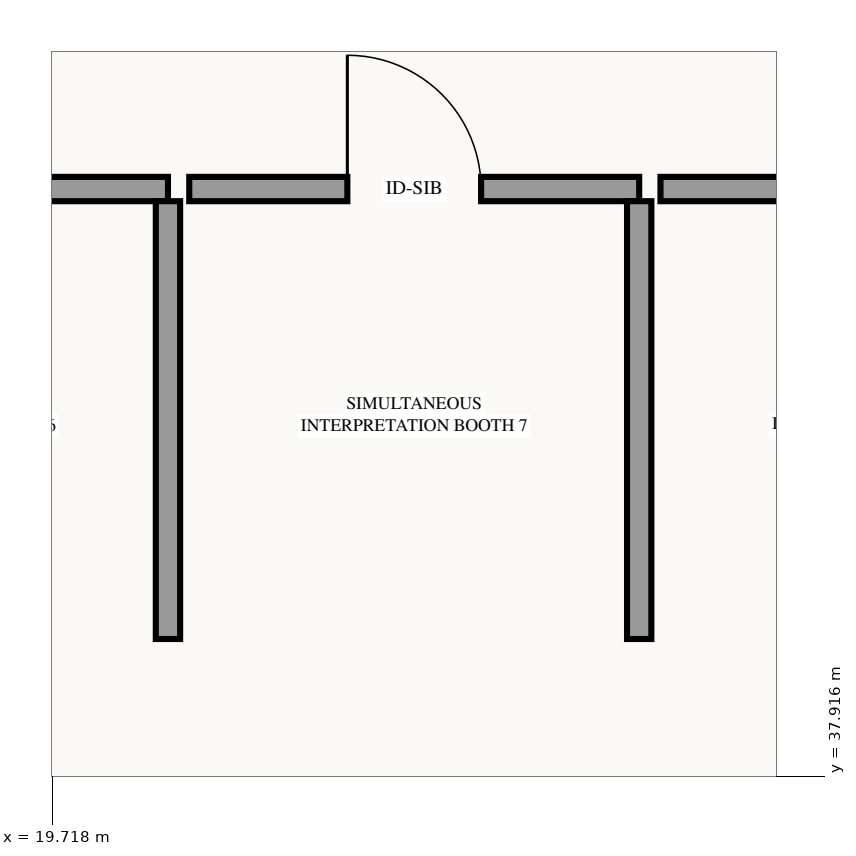
"""IFC4 building model, lengths in metres.
Left out: names, types, materials, properties, quantities, classifications, styles, units other than length and angle.
Written with IfcOpenShell. Run it as: python <this file> out.ifc"""

import sys

from ifc_helpers import new_model, si_unit, direction, frame, frame_2d, origin, place, context, subcontext, project, spatial, rectangle, extrude, element, fill, save


model = new_model("IFC4")
c1 = context("Model", 3, precision=1e-05, world=origin(), true_north=direction((0.0, 1.0)))
c2 = subcontext(c1, "Body", "Model", "MODEL_VIEW")
j1 = project(units=[si_unit("LENGTHUNIT", "METRE"), si_unit("PLANEANGLEUNIT", "RADIAN")], contexts=[c1])
p1 = place(None, origin())
s1 = spatial("IfcSite", under=j1, at=p1, CompositionType="ELEMENT")
p2 = place(p1, origin())
s2 = spatial("IfcBuilding", under=s1, at=p2, CompositionType="ELEMENT")
p3 = place(p2, frame((0.0, 0.0, 5.4)))
s3 = spatial("IfcBuildingStorey", under=s2, at=p3, CompositionType="ELEMENT", Elevation=5.4)
p4 = place(p3, frame((17.52, 41.78, 0.0), z_axis=(0.0, 0.0, 1.0), x_axis=(1.0, 0.0, 0.0)))
e1 = element("IfcWall", 1, at=p4, inside=s3, PredefinedType="PARTITIONING", context=c2, shape_type="SweptSolid", body=[
    extrude(rectangle(XDim=2.96, YDim=0.16, at=frame_2d((1.48, 0.0))), origin(), (0.0, 0.0, 1.0), 4.235),
])
p5 = place(p4, frame((1.04, 0.0, 0.0)))
e2 = element("IfcOpeningElement", 2, at=p5, cuts=e1, PredefinedType="OPENING", context=c2, shape_type="SweptSolid", body=[
    extrude(rectangle(XDim=0.88, YDim=2.05, at=frame_2d((0.44, 1.025))), frame((0.0, 0.09, 0.0), z_axis=(0.0, -1.0, 0.0), x_axis=(1.0, 0.0, 0.0)), (0.0, 0.0, 1.0), 0.18),
])
p6 = place(p3, frame((20.48, 38.82, 0.0), z_axis=(0.0, 0.0, 1.0), x_axis=(0.0, 1.0, 0.0)))
e3 = element("IfcWall", 3, at=p6, inside=s3, PredefinedType="PARTITIONING", context=c2, shape_type="SweptSolid", body=[
    extrude(rectangle(XDim=2.88, YDim=0.16, at=frame_2d((1.44, 0.0))), origin(), (0.0, 0.0, 1.0), 4.235),
])
p7 = place(p3, frame((20.62, 41.78, 0.0), z_axis=(0.0, 0.0, 1.0), x_axis=(1.0, 0.0, 0.0)))
e4 = element("IfcWall", 4, at=p7, inside=s3, PredefinedType="PARTITIONING", context=c2, shape_type="SweptSolid", body=[
    extrude(rectangle(XDim=2.96, YDim=0.16, at=frame_2d((1.48, 0.0))), origin(), (0.0, 0.0, 1.0), 4.235),
])
p8 = place(p7, frame((1.04, 0.0, 0.0)))
e5 = element("IfcOpeningElement", 5, at=p8, cuts=e4, PredefinedType="OPENING", context=c2, shape_type="SweptSolid", body=[
    extrude(rectangle(XDim=0.88, YDim=2.05, at=frame_2d((0.44, 1.025))), frame((0.0, 0.09, 0.0), z_axis=(0.0, -1.0, 0.0), x_axis=(1.0, 0.0, 0.0)), (0.0, 0.0, 1.0), 0.18),
])
p9 = place(p3, frame((23.58, 38.82, 0.0), z_axis=(0.0, 0.0, 1.0), x_axis=(0.0, 1.0, 0.0)))
e6 = element("IfcWall", 6, at=p9, inside=s3, PredefinedType="PARTITIONING", context=c2, shape_type="SweptSolid", body=[
    extrude(rectangle(XDim=2.88, YDim=0.16, at=frame_2d((1.44, 0.0))), origin(), (0.0, 0.0, 1.0), 4.235),
])
p10 = place(p3, frame((23.72, 41.78, 0.0), z_axis=(0.0, 0.0, 1.0), x_axis=(1.0, 0.0, 0.0)))
e7 = element("IfcWall", 7, at=p10, inside=s3, PredefinedType="PARTITIONING", context=c2, shape_type="SweptSolid", body=[
    extrude(rectangle(XDim=2.96, YDim=0.16, at=frame_2d((1.48, 0.0))), origin(), (0.0, 0.0, 1.0), 4.235),
])
p11 = place(p10, frame((1.74, 0.0, 0.0)))
e8 = element("IfcOpeningElement", 8, at=p11, cuts=e7, PredefinedType="OPENING", context=c2, shape_type="SweptSolid", body=[
    extrude(rectangle(XDim=0.88, YDim=2.05, at=frame_2d((0.44, 1.025))), frame((0.0, 0.09, 0.0), z_axis=(0.0, -1.0, 0.0), x_axis=(1.0, 0.0, 0.0)), (0.0, 0.0, 1.0), 0.18),
])
p12 = place(p8, origin())
e9 = element("IfcDoor", 9, at=p12, inside=s3, OperationType="SINGLE_SWING_LEFT", PredefinedType="DOOR", context=c2, shape_type="SweptSolid", body=[
    extrude(rectangle(XDim=0.88, YDim=2.05, at=frame_2d((0.44, 1.025))), frame((0.0, 0.025, 0.0), z_axis=(0.0, -1.0, 0.0), x_axis=(1.0, 0.0, 0.0)), (0.0, 0.0, 1.0), 0.05),
])
fill(e5, e9)
save(model, sys.argv[1])
